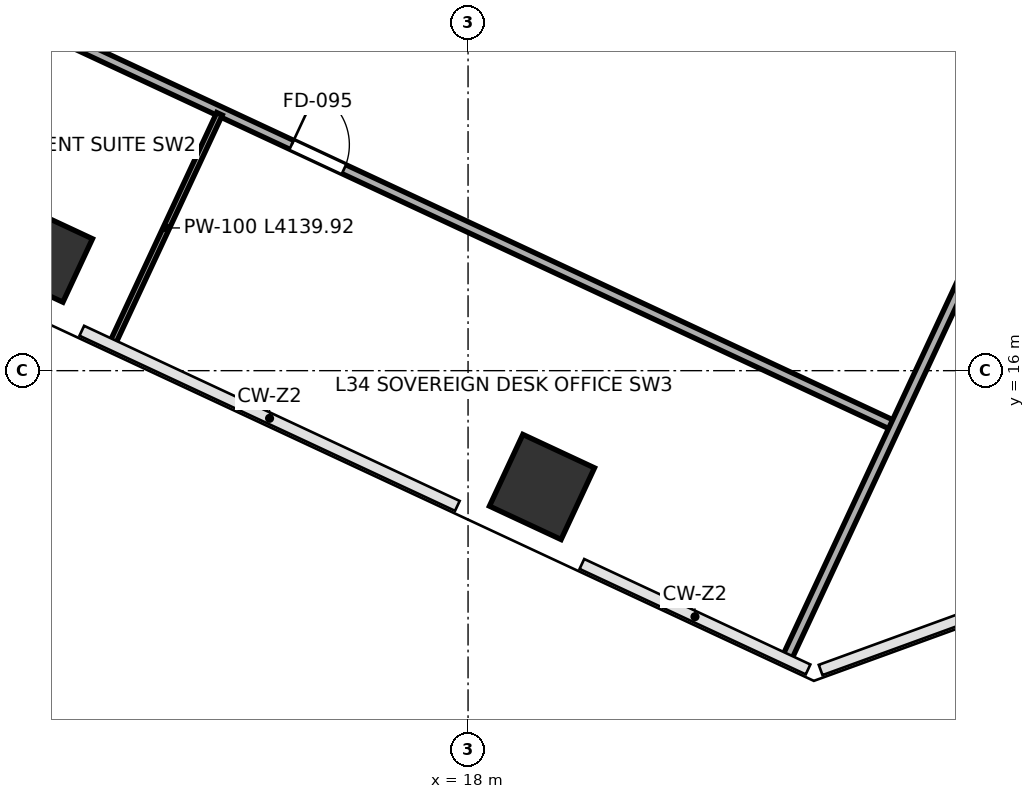
"""IFC4 building model, lengths in metres.
Left out: names, types, materials, properties, quantities, classifications, styles, units other than length and angle.
Written with IfcOpenShell. Run it as: python <this file> out.ifc"""

import sys

from ifc_helpers import new_model, si_unit, direction, frame, frame_2d, origin, origin_2d, place, context, subcontext, project, spatial, rectangle, extrude, source, transform, mapped, element, fill, save


model = new_model("IFC4")
c1 = context("Model", 3, precision=1e-05, world=origin(), true_north=direction((0.0, 1.0)))
c2 = subcontext(c1, "Body", "Model", "MODEL_VIEW")
j1 = project(units=[si_unit("LENGTHUNIT", "METRE"), si_unit("PLANEANGLEUNIT", "RADIAN")], contexts=[c1])
p1 = place(None, origin())
s1 = spatial("IfcSite", under=j1, at=p1, CompositionType="ELEMENT")
p2 = place(p1, origin())
s2 = spatial("IfcBuilding", under=s1, at=p2, CompositionType="ELEMENT")
p3 = place(p2, frame((0.0, 0.0, 154.0)))
s3 = spatial("IfcBuildingStorey", under=s2, at=p3, CompositionType="ELEMENT", Elevation=154.0)
m1 = source(origin(), c2, "Body", "SweptSolid", [
    extrude(rectangle(XDim=1.15, YDim=1.15, at=origin_2d()), origin(), (0.0, 0.0, 1.0), 4.198),
])
p4 = place(p3, frame((11.059, 17.891, 0.001), z_axis=(0.0, 0.0, 1.0), x_axis=(-0.906307787037, 0.422618261741, 0.0)))
e1 = element("IfcColumn", 1, at=p4, inside=s3, PredefinedType="COLUMN", context=c2, shape_type="MappedRepresentation", body=[
    mapped(m1, transform((0.0, 0.0, 0.0), scale=1.0)),
])
m2 = source(origin(), c2, "Body", "SweptSolid", [
    extrude(rectangle(XDim=1.3, YDim=1.3, at=origin_2d()), origin(), (0.0, 0.0, 1.0), 4.198),
])
p5 = place(p3, frame((19.216, 14.087, 0.001), z_axis=(0.0, 0.0, 1.0), x_axis=(-0.906307787037, 0.422618261741, 0.0)))
e2 = element("IfcColumn", 2, at=p5, inside=s3, PredefinedType="COLUMN", context=c2, shape_type="MappedRepresentation", body=[
    mapped(m2, transform((0.0, 0.0, 0.0), scale=1.0)),
])
p6 = place(p3, frame((7.213, 23.391, 0.0), z_axis=(0.0, 0.0, 1.0), x_axis=(0.906304602938, -0.422625089996, 0.0)))
e3 = element("IfcWall", 3, at=p6, inside=s3, PredefinedType="PARTITIONING", context=c2, shape_type="SweptSolid", body=[
    extrude(rectangle(XDim=19.61, YDim=0.16, at=frame_2d((9.805, 0.0))), origin(), (0.0, 0.0, 1.0), 3.96),
])
p7 = place(p6, frame((1.45, 0.0, 0.0)))
e4 = element("IfcOpeningElement", 4, at=p7, cuts=e3, PredefinedType="OPENING", context=c2, shape_type="SweptSolid", body=[
    extrude(rectangle(XDim=0.95, YDim=2.15, at=frame_2d((0.475, 1.075))), frame((0.0, 0.09, 0.0), z_axis=(0.0, -1.0, 0.0), x_axis=(1.0, 0.0, 0.0)), (0.0, 0.0, 1.0), 0.18),
])
p8 = place(p6, frame((8.7, 0.0, 0.0)))
e5 = element("IfcOpeningElement", 5, at=p8, cuts=e3, PredefinedType="OPENING", context=c2, shape_type="SweptSolid", body=[
    extrude(rectangle(XDim=0.95, YDim=2.15, at=frame_2d((0.475, 1.075))), frame((0.0, 0.09, 0.0), z_axis=(0.0, -1.0, 0.0), x_axis=(1.0, 0.0, 0.0)), (0.0, 0.0, 1.0), 0.18),
])
p9 = place(p3, frame((12.162, 16.471, 0.0), z_axis=(0.0, 0.0, 1.0), x_axis=(0.422656233697, 0.906290079454, 0.0)))
e6 = element("IfcWall", 6, at=p9, inside=s3, PredefinedType="PARTITIONING", context=c2, shape_type="SweptSolid", body=[
    extrude(rectangle(XDim=4.14, YDim=0.1, at=frame_2d((2.07, 0.0))), origin(), (0.0, 0.0, 1.0), 3.195),
])
p10 = place(p3, frame((23.256, 11.299, 0.0), z_axis=(0.0, 0.0, 1.0), x_axis=(0.422623489462, 0.906305349292, 0.0)))
e7 = element("IfcWall", 7, at=p10, inside=s3, PredefinedType="PARTITIONING", context=c2, shape_type="SweptSolid", body=[
    extrude(rectangle(XDim=21.48, YDim=0.16, at=frame_2d((10.74, 0.0))), origin(), (0.0, 0.0, 1.0), 3.96),
])
m3 = source(origin(), c2, "Body", "SweptSolid", [
    extrude(rectangle(XDim=0.95, YDim=2.15, at=frame_2d((0.475, 1.075))), frame((0.0, 0.025, 0.0), z_axis=(0.0, -1.0, 0.0), x_axis=(1.0, 0.0, 0.0)), (0.0, 0.0, 1.0), 0.05),
])
p11 = place(p8, origin())
e8 = element("IfcDoor", 8, at=p11, inside=s3, OperationType="SINGLE_SWING_LEFT", PredefinedType="DOOR", context=c2, shape_type="MappedRepresentation", body=[
    mapped(m3, transform((0.0, 0.0, 0.0), scale=1.0)),
])
fill(e5, e8)
save(model, sys.argv[1])
